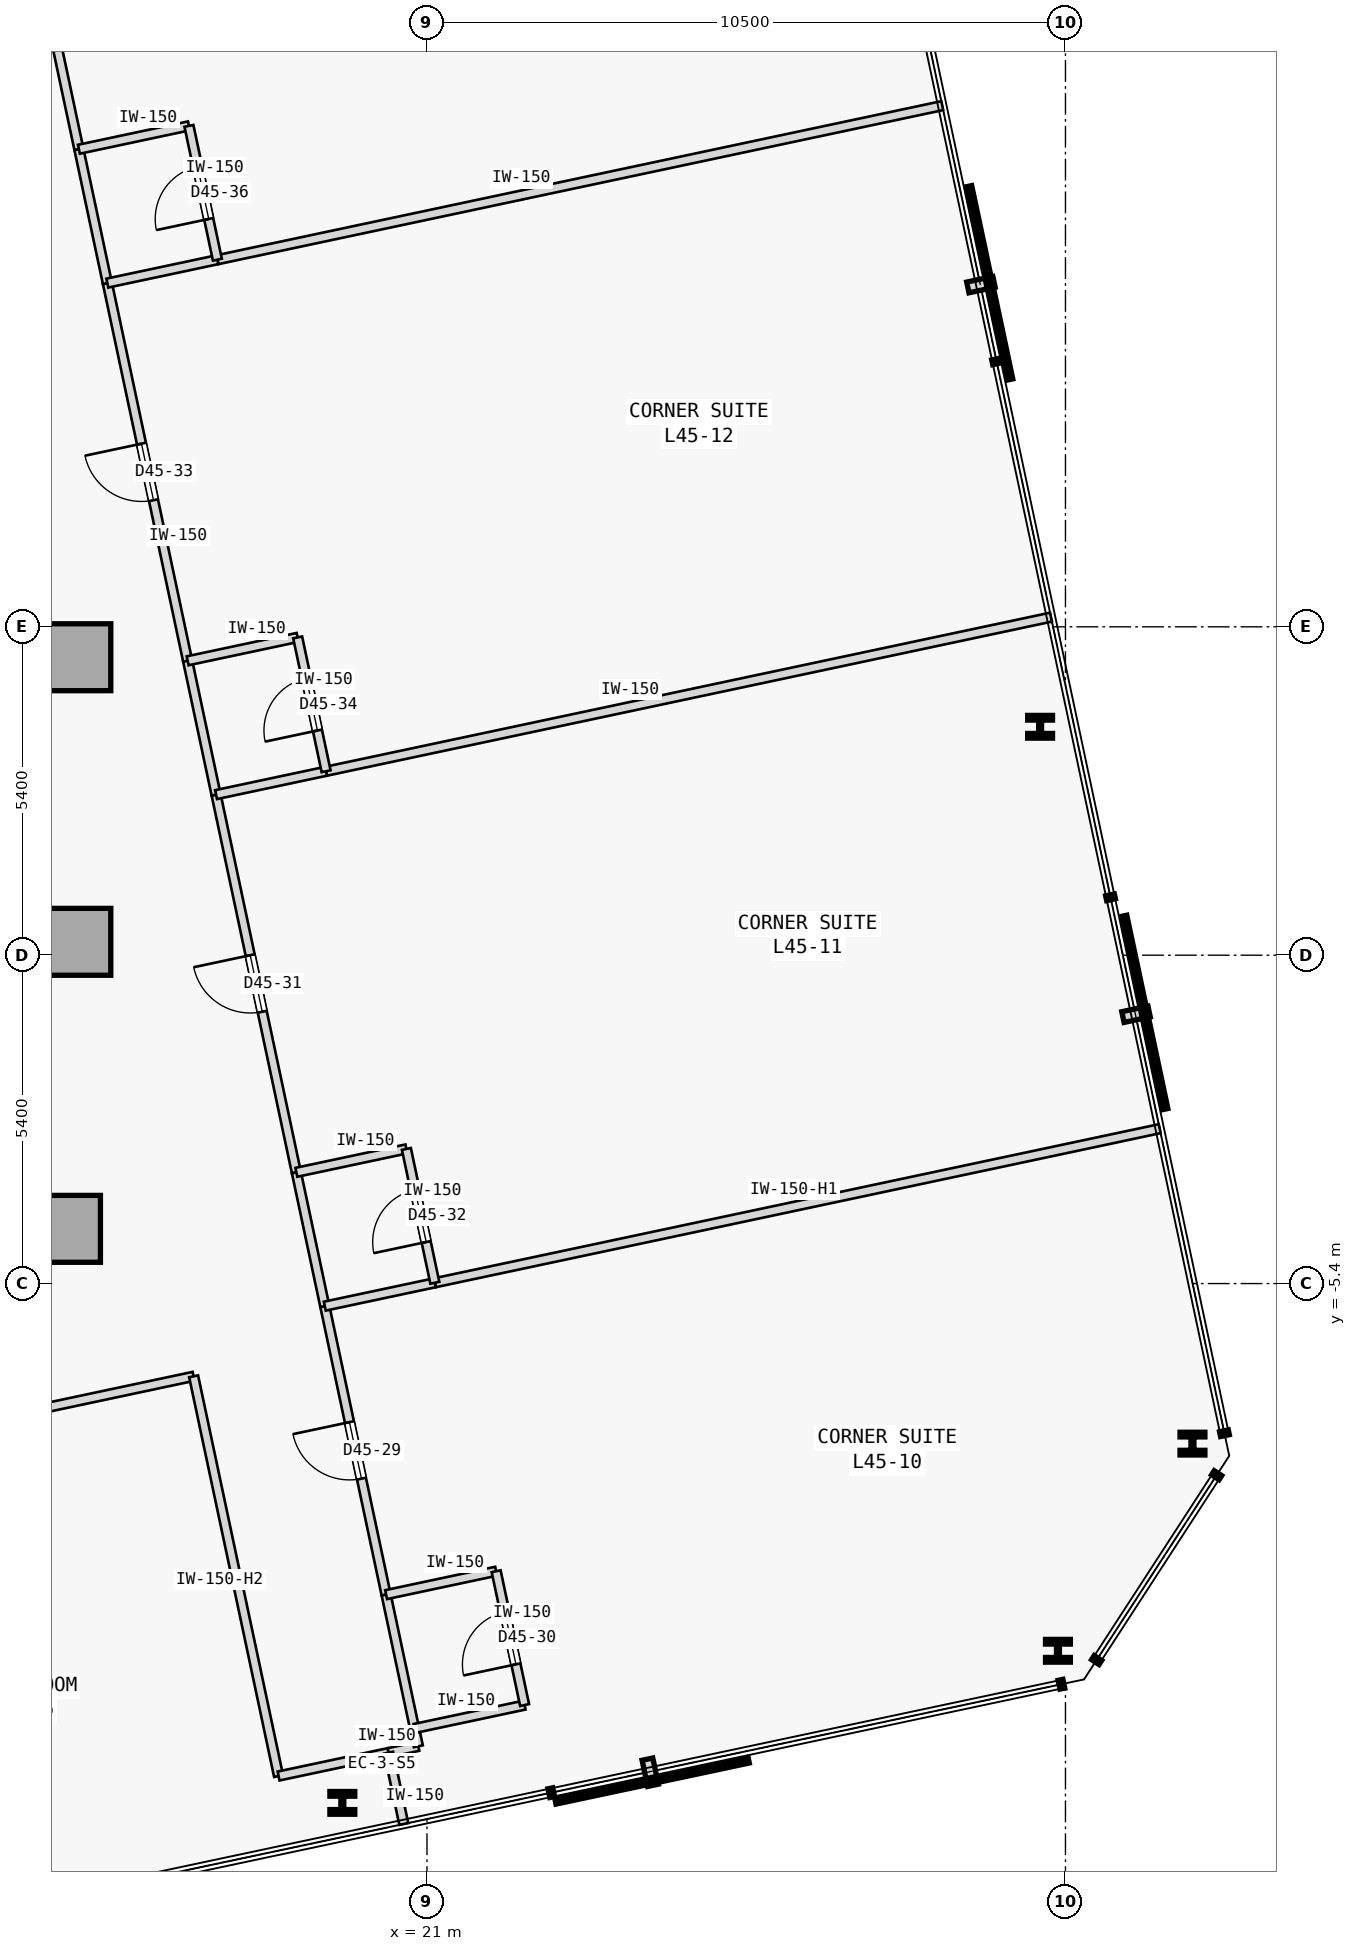
"""IFC4 building model, lengths in metres.
Left out: names, types, materials, properties, quantities, classifications, styles, units other than length and angle.
Written with IfcOpenShell. Run it as: python <this file> out.ifc"""

import sys

from ifc_helpers import new_model, si_unit, direction, frame, frame_2d, origin, origin_2d, place, context, subcontext, project, spatial, rectangle, i_section, extrude, element, fill, save


model = new_model("IFC4")
c1 = context("Model", 3, precision=1e-05, world=origin(), true_north=direction((0.0, 1.0)))
c2 = subcontext(c1, "Body", "Model", "MODEL_VIEW")
j1 = project(units=[si_unit("LENGTHUNIT", "METRE"), si_unit("PLANEANGLEUNIT", "RADIAN")], contexts=[c1])
p1 = place(None, origin())
s1 = spatial("IfcSite", under=j1, at=p1, CompositionType="ELEMENT")
p2 = place(p1, origin())
s2 = spatial("IfcBuilding", under=s1, at=p2, CompositionType="ELEMENT")
p3 = place(p2, frame((0.0, 0.0, 175.2)))
s3 = spatial("IfcBuildingStorey", under=s2, at=p3, CompositionType="ELEMENT", Elevation=175.2)
for number, where, z_axis, x_axis in (
    (1, (15.25, 4.9, 0.0), (0.0, 0.0, 1.0), (1.0, 0.0, 0.0)),
    (2, (15.25, 0.22, 0.0), (0.0, 0.0, 1.0), (1.0, 0.0, 0.0)),
    (3, (15.08, -4.5, 0.0), (0.0, 0.0, 1.0), (1.0, 0.0, 0.0)),
):
    element("IfcColumn", number, at=place(p3, frame(where, z_axis=z_axis, x_axis=x_axis)), inside=s3, PredefinedType="COLUMN", context=c2, shape_type="SweptSolid", body=[
        extrude(rectangle(XDim=1.1, YDim=1.1, at=origin_2d()), origin(), (0.0, 0.0, 1.0), 3.4),
    ])
for number, where, z_axis, x_axis in (
    (4, (19.608, -13.94, 0.0), (0.0, 0.0, 1.0), (1.0, 0.0, 0.0)),
    (5, (31.376, -11.439, 0.0), (0.0, 0.0, 1.0), (1.0, 0.0, 0.0)),
    (6, (33.589, -8.032, 0.0), (0.0, 0.0, 1.0), (1.0, 0.0, 0.0)),
    (7, (31.083, 3.756, 0.0), (0.0, 0.0, 1.0), (1.0, 0.0, 0.0)),
):
    element("IfcColumn", number, at=place(p3, frame(where, z_axis=z_axis, x_axis=x_axis)), inside=s3, PredefinedType="COLUMN", context=c2, shape_type="SweptSolid", body=[
        extrude(i_section(OverallWidth=0.409, OverallDepth=0.374, WebThickness=0.048, FlangeThickness=0.077, FilletRadius=0.015, at=origin_2d()), origin(), (0.0, 0.0, 1.0), 3.4),
    ])
p4 = place(p3, frame((10.309, -8.382, 0.0), z_axis=(0.0, 0.0, 1.0), x_axis=(0.978149817889, 0.207901259648, 0.0)))
e8 = element("IfcWall", 8, at=p4, inside=s3, PredefinedType="PARTITIONING", context=c2, shape_type="SweptSolid", body=[
    extrude(rectangle(XDim=7.007, YDim=0.15, at=frame_2d((3.503, 0.0))), origin(), (0.0, 0.0, 1.0), 3.175),
])
p5 = place(p4, frame((3.043, 0.0, 0.0)))
e9 = element("IfcOpeningElement", 9, at=p5, cuts=e8, PredefinedType="OPENING", context=c2, shape_type="SweptSolid", body=[
    extrude(rectangle(XDim=0.92, YDim=2.15, at=frame_2d((0.46, 1.075))), frame((0.0, 0.085, 0.0), z_axis=(0.0, -1.0, 0.0), x_axis=(1.0, 0.0, 0.0)), (0.0, 0.0, 1.0), 0.17),
])
p6 = place(p3, frame((18.56, -13.498, 0.0), z_axis=(0.0, 0.0, 1.0), x_axis=(-0.207888737749, 0.978152479278, 0.0)))
e10 = element("IfcWall", 10, at=p6, inside=s3, PredefinedType="PARTITIONING", context=c2, shape_type="SweptSolid", body=[
    extrude(rectangle(XDim=6.72, YDim=0.15, at=frame_2d((3.36, 0.0))), origin(), (0.0, 0.0, 1.0), 2.575),
])
p7 = place(p3, frame((18.56, -13.498, 0.0), z_axis=(0.0, 0.0, 1.0), x_axis=(0.978160192495, 0.207852442415, 0.0)))
e11 = element("IfcWall", 11, at=p7, inside=s3, PredefinedType="PARTITIONING", context=c2, shape_type="SweptSolid", body=[
    extrude(rectangle(XDim=1.85, YDim=0.15, at=frame_2d((0.925, 0.0))), origin(), (0.0, 0.0, 1.0), 3.175),
])
p8 = place(p3, frame((20.369, -13.114, 0.0), z_axis=(0.0, 0.0, 1.0), x_axis=(0.978143962546, 0.207928806409, 0.0)))
e12 = element("IfcWall", 12, at=p8, inside=s3, PredefinedType="PARTITIONING", context=c2, shape_type="SweptSolid", body=[
    extrude(rectangle(XDim=0.5, YDim=0.15, at=frame_2d((0.25, 0.0))), origin(), (0.0, 0.0, 1.0), 3.175),
])
p9 = place(p3, frame((20.858, -13.01, 0.0), z_axis=(0.0, 0.0, 1.0), x_axis=(-0.208306395052, 0.978063620518, 0.0)))
e13 = element("IfcWall", 13, at=p9, inside=s3, PredefinedType="PARTITIONING", context=c2, shape_type="SweptSolid", body=[
    extrude(rectangle(XDim=0.3, YDim=0.15, at=frame_2d((0.15, 0.0))), origin(), (0.0, 0.0, 1.0), 3.175),
])
p10 = place(p3, frame((20.328, -10.515, 0.0), z_axis=(0.0, 0.0, 1.0), x_axis=(-0.207950868925, 0.97813927235, 0.0)))
e14 = element("IfcWall", 14, at=p10, inside=s3, PredefinedType="PARTITIONING", context=c2, shape_type="SweptSolid", body=[
    extrude(rectangle(XDim=4.85, YDim=0.15, at=frame_2d((2.425, 0.0))), origin(), (0.0, 0.0, 1.0), 3.175),
])
p11 = place(p10, frame((1.95, 0.0, 0.0)))
e15 = element("IfcOpeningElement", 15, at=p11, cuts=e14, PredefinedType="OPENING", context=c2, shape_type="SweptSolid", body=[
    extrude(rectangle(XDim=0.95, YDim=2.15, at=frame_2d((0.475, 1.075))), frame((0.0, 0.085, 0.0), z_axis=(0.0, -1.0, 0.0), x_axis=(1.0, 0.0, 0.0)), (0.0, 0.0, 1.0), 0.17),
])
p12 = place(p3, frame((20.796, -12.716, 0.0), z_axis=(0.0, 0.0, 1.0), x_axis=(-0.207891197838, 0.978151956427, 0.0)))
e16 = element("IfcWall", 16, at=p12, inside=s3, PredefinedType="PARTITIONING", context=c2, shape_type="SweptSolid", body=[
    extrude(rectangle(XDim=2.25, YDim=0.15, at=frame_2d((1.125, 0.0))), origin(), (0.0, 0.0, 1.0), 3.175),
])
p13 = place(p3, frame((18.852, -3.571, 0.0), z_axis=(0.0, 0.0, 1.0), x_axis=(-0.207879907349, 0.978154355979, 0.0)))
e17 = element("IfcWall", 17, at=p13, inside=s3, PredefinedType="PARTITIONING", context=c2, shape_type="SweptSolid", body=[
    extrude(rectangle(XDim=6.35, YDim=0.15, at=frame_2d((3.175, 0.0))), origin(), (0.0, 0.0, 1.0), 3.175),
])
p14 = place(p13, frame((2.7, 0.0, 0.0)))
e18 = element("IfcOpeningElement", 18, at=p14, cuts=e17, PredefinedType="OPENING", context=c2, shape_type="SweptSolid", body=[
    extrude(rectangle(XDim=0.95, YDim=2.15, at=frame_2d((0.475, 1.075))), frame((0.0, 0.085, 0.0), z_axis=(0.0, -1.0, 0.0), x_axis=(1.0, 0.0, 0.0)), (0.0, 0.0, 1.0), 0.17),
])
p15 = place(p3, frame((19.32, -5.771, 0.0), z_axis=(0.0, 0.0, 1.0), x_axis=(-0.207913264065, 0.978147266328, 0.0)))
e19 = element("IfcWall", 19, at=p15, inside=s3, PredefinedType="PARTITIONING", context=c2, shape_type="SweptSolid", body=[
    extrude(rectangle(XDim=2.25, YDim=0.15, at=frame_2d((1.125, 0.0))), origin(), (0.0, 0.0, 1.0), 3.175),
])
p16 = place(p3, frame((17.064, 4.841, 0.0), z_axis=(0.0, 0.0, 1.0), x_axis=(-0.207924511115, 0.978144875608, 0.0)))
e20 = element("IfcWall", 20, at=p16, inside=s3, PredefinedType="PARTITIONING", context=c2, shape_type="SweptSolid", body=[
    extrude(rectangle(XDim=6.35, YDim=0.15, at=frame_2d((3.175, 0.0))), origin(), (0.0, 0.0, 1.0), 3.175),
])
p17 = place(p16, frame((2.7, 0.0, 0.0)))
e21 = element("IfcOpeningElement", 21, at=p17, cuts=e20, PredefinedType="OPENING", context=c2, shape_type="SweptSolid", body=[
    extrude(rectangle(XDim=0.95, YDim=2.15, at=frame_2d((0.475, 1.075))), frame((0.0, 0.085, 0.0), z_axis=(0.0, -1.0, 0.0), x_axis=(1.0, 0.0, 0.0)), (0.0, 0.0, 1.0), 0.17),
])
p18 = place(p3, frame((17.532, 2.641, 0.0), z_axis=(0.0, 0.0, 1.0), x_axis=(-0.207913264065, 0.978147266328, 0.0)))
e22 = element("IfcWall", 22, at=p18, inside=s3, PredefinedType="PARTITIONING", context=c2, shape_type="SweptSolid", body=[
    extrude(rectangle(XDim=2.25, YDim=0.15, at=frame_2d((1.125, 0.0))), origin(), (0.0, 0.0, 1.0), 3.175),
])
p19 = place(p3, frame((15.276, 13.253, 0.0), z_axis=(0.0, 0.0, 1.0), x_axis=(-0.207924511115, 0.978144875608, 0.0)))
e23 = element("IfcWall", 23, at=p19, inside=s3, PredefinedType="PARTITIONING", context=c2, shape_type="SweptSolid", body=[
    extrude(rectangle(XDim=6.35, YDim=0.15, at=frame_2d((3.175, 0.0))), origin(), (0.0, 0.0, 1.0), 3.175),
])
p20 = place(p19, frame((2.7, 0.0, 0.0)))
e24 = element("IfcOpeningElement", 24, at=p20, cuts=e23, PredefinedType="OPENING", context=c2, shape_type="SweptSolid", body=[
    extrude(rectangle(XDim=0.95, YDim=2.15, at=frame_2d((0.475, 1.075))), frame((0.0, 0.085, 0.0), z_axis=(0.0, -1.0, 0.0), x_axis=(1.0, 0.0, 0.0)), (0.0, 0.0, 1.0), 0.17),
])
p21 = place(p3, frame((15.744, 11.052, 0.0), z_axis=(0.0, 0.0, 1.0), x_axis=(-0.207891197838, 0.978151956427, 0.0)))
e25 = element("IfcWall", 25, at=p21, inside=s3, PredefinedType="PARTITIONING", context=c2, shape_type="SweptSolid", body=[
    extrude(rectangle(XDim=2.25, YDim=0.15, at=frame_2d((1.125, 0.0))), origin(), (0.0, 0.0, 1.0), 3.175),
])
p22 = place(p3, frame((20.619, -14.288, 0.0), z_axis=(0.0, 0.0, 1.0), x_axis=(-0.207917150959, 0.978146440129, 0.0)))
e26 = element("IfcWall", 26, at=p22, inside=s3, PredefinedType="PARTITIONING", context=c2, shape_type="SweptSolid", body=[
    extrude(rectangle(XDim=1.2, YDim=0.15, at=frame_2d((0.6, 0.0))), origin(), (0.0, 0.0, 1.0), 3.175),
])
for number, where, z_axis, x_axis in (
    (27, (20.796, -12.716, 0.0), (0.0, 0.0, 1.0), (0.978, 0.208, 0.0)),
    (28, (20.328, -10.515, 0.0), (0.0, 0.0, 1.0), (0.978, 0.208, 0.0)),
):
    element("IfcWall", number, at=place(p3, frame(where, z_axis=z_axis, x_axis=x_axis)), inside=s3, PredefinedType="PARTITIONING", context=c2, shape_type="SweptSolid", body=[
        extrude(rectangle(XDim=1.85, YDim=0.15, at=frame_2d((0.925, 0.0))), origin(), (0.0, 0.0, 1.0), 3.175),
    ])
p23 = place(p3, frame((22.605, -12.332, 0.0), z_axis=(0.0, 0.0, 1.0), x_axis=(-0.207891197838, 0.978151956427, 0.0)))
e29 = element("IfcWall", 29, at=p23, inside=s3, PredefinedType="PARTITIONING", context=c2, shape_type="SweptSolid", body=[
    extrude(rectangle(XDim=2.25, YDim=0.15, at=frame_2d((1.125, 0.0))), origin(), (0.0, 0.0, 1.0), 3.175),
])
p24 = place(p23, frame((0.685, 0.0, 0.0)))
e30 = element("IfcOpeningElement", 30, at=p24, cuts=e29, PredefinedType="OPENING", context=c2, shape_type="SweptSolid", body=[
    extrude(rectangle(XDim=0.88, YDim=2.15, at=frame_2d((0.44, 1.075))), frame((0.0, 0.085, 0.0), z_axis=(0.0, -1.0, 0.0), x_axis=(1.0, 0.0, 0.0)), (0.0, 0.0, 1.0), 0.17),
])
p25 = place(p3, frame((21.129, -5.387, 0.0), z_axis=(0.0, 0.0, 1.0), x_axis=(0.97814556055, 0.207921288896, 0.0)))
e31 = element("IfcWall", 31, at=p25, inside=s3, PredefinedType="PARTITIONING", context=c2, shape_type="SweptSolid", body=[
    extrude(rectangle(XDim=12.187, YDim=0.15, at=frame_2d((6.094, 0.0))), origin(), (0.0, 0.0, 1.0), 2.725),
])
p26 = place(p3, frame((19.32, -5.771, 0.0), z_axis=(0.0, 0.0, 1.0), x_axis=(0.978165892835, 0.207825614625, 0.0)))
e32 = element("IfcWall", 32, at=p26, inside=s3, PredefinedType="PARTITIONING", context=c2, shape_type="SweptSolid", body=[
    extrude(rectangle(XDim=1.85, YDim=0.15, at=frame_2d((0.925, 0.0))), origin(), (0.0, 0.0, 1.0), 3.175),
])
p27 = place(p3, frame((18.852, -3.571, 0.0), z_axis=(0.0, 0.0, 1.0), x_axis=(0.978139061018, 0.207951862966, 0.0)))
e33 = element("IfcWall", 33, at=p27, inside=s3, PredefinedType="PARTITIONING", context=c2, shape_type="SweptSolid", body=[
    extrude(rectangle(XDim=1.85, YDim=0.15, at=frame_2d((0.925, 0.0))), origin(), (0.0, 0.0, 1.0), 3.175),
])
p28 = place(p3, frame((21.129, -5.387, 0.0), z_axis=(0.0, 0.0, 1.0), x_axis=(-0.207891197838, 0.978151956427, 0.0)))
e34 = element("IfcWall", 34, at=p28, inside=s3, PredefinedType="PARTITIONING", context=c2, shape_type="SweptSolid", body=[
    extrude(rectangle(XDim=2.25, YDim=0.15, at=frame_2d((1.125, 0.0))), origin(), (0.0, 0.0, 1.0), 3.175),
])
p29 = place(p28, frame((0.685, 0.0, 0.0)))
e35 = element("IfcOpeningElement", 35, at=p29, cuts=e34, PredefinedType="OPENING", context=c2, shape_type="SweptSolid", body=[
    extrude(rectangle(XDim=0.88, YDim=2.15, at=frame_2d((0.44, 1.075))), frame((0.0, 0.085, 0.0), z_axis=(0.0, -1.0, 0.0), x_axis=(1.0, 0.0, 0.0)), (0.0, 0.0, 1.0), 0.17),
])
p30 = place(p3, frame((19.341, 3.025, 0.0), z_axis=(0.0, 0.0, 1.0), x_axis=(0.97814556055, 0.207921288896, 0.0)))
e36 = element("IfcWall", 36, at=p30, inside=s3, PredefinedType="PARTITIONING", context=c2, shape_type="SweptSolid", body=[
    extrude(rectangle(XDim=12.187, YDim=0.15, at=frame_2d((6.094, 0.0))), origin(), (0.0, 0.0, 1.0), 3.175),
])
p31 = place(p3, frame((17.532, 2.641, 0.0), z_axis=(0.0, 0.0, 1.0), x_axis=(0.978160192495, 0.207852442415, 0.0)))
e37 = element("IfcWall", 37, at=p31, inside=s3, PredefinedType="PARTITIONING", context=c2, shape_type="SweptSolid", body=[
    extrude(rectangle(XDim=1.85, YDim=0.15, at=frame_2d((0.925, 0.0))), origin(), (0.0, 0.0, 1.0), 3.175),
])
p32 = place(p3, frame((17.064, 4.841, 0.0), z_axis=(0.0, 0.0, 1.0), x_axis=(0.978133353907, 0.20797870558, 0.0)))
e38 = element("IfcWall", 38, at=p32, inside=s3, PredefinedType="PARTITIONING", context=c2, shape_type="SweptSolid", body=[
    extrude(rectangle(XDim=1.85, YDim=0.15, at=frame_2d((0.925, 0.0))), origin(), (0.0, 0.0, 1.0), 3.175),
])
p33 = place(p3, frame((19.341, 3.025, 0.0), z_axis=(0.0, 0.0, 1.0), x_axis=(-0.207891197838, 0.978151956427, 0.0)))
e39 = element("IfcWall", 39, at=p33, inside=s3, PredefinedType="PARTITIONING", context=c2, shape_type="SweptSolid", body=[
    extrude(rectangle(XDim=2.25, YDim=0.15, at=frame_2d((1.125, 0.0))), origin(), (0.0, 0.0, 1.0), 3.175),
])
p34 = place(p33, frame((0.685, 0.0, 0.0)))
e40 = element("IfcOpeningElement", 40, at=p34, cuts=e39, PredefinedType="OPENING", context=c2, shape_type="SweptSolid", body=[
    extrude(rectangle(XDim=0.88, YDim=2.15, at=frame_2d((0.44, 1.075))), frame((0.0, 0.085, 0.0), z_axis=(0.0, -1.0, 0.0), x_axis=(1.0, 0.0, 0.0)), (0.0, 0.0, 1.0), 0.17),
])
p35 = place(p3, frame((17.553, 11.437, 0.0), z_axis=(0.0, 0.0, 1.0), x_axis=(0.97814556055, 0.207921288896, 0.0)))
e41 = element("IfcWall", 41, at=p35, inside=s3, PredefinedType="PARTITIONING", context=c2, shape_type="SweptSolid", body=[
    extrude(rectangle(XDim=12.187, YDim=0.15, at=frame_2d((6.094, 0.0))), origin(), (0.0, 0.0, 1.0), 3.175),
])
for number, where, z_axis, x_axis in (
    (42, (15.744, 11.052, 0.0), (0.0, 0.0, 1.0), (0.978, 0.208, 0.0)),
    (43, (15.276, 13.253, 0.0), (0.0, 0.0, 1.0), (0.978, 0.208, 0.0)),
):
    element("IfcWall", number, at=place(p3, frame(where, z_axis=z_axis, x_axis=x_axis)), inside=s3, PredefinedType="PARTITIONING", context=c2, shape_type="SweptSolid", body=[
        extrude(rectangle(XDim=1.85, YDim=0.15, at=frame_2d((0.925, 0.0))), origin(), (0.0, 0.0, 1.0), 3.175),
    ])
p36 = place(p3, frame((17.553, 11.437, 0.0), z_axis=(0.0, 0.0, 1.0), x_axis=(-0.207891197838, 0.978151956427, 0.0)))
e44 = element("IfcWall", 44, at=p36, inside=s3, PredefinedType="PARTITIONING", context=c2, shape_type="SweptSolid", body=[
    extrude(rectangle(XDim=2.25, YDim=0.15, at=frame_2d((1.125, 0.0))), origin(), (0.0, 0.0, 1.0), 3.175),
])
p37 = place(p36, frame((0.685, 0.0, 0.0)))
e45 = element("IfcOpeningElement", 45, at=p37, cuts=e44, PredefinedType="OPENING", context=c2, shape_type="SweptSolid", body=[
    extrude(rectangle(XDim=0.88, YDim=2.15, at=frame_2d((0.44, 1.075))), frame((0.0, 0.085, 0.0), z_axis=(0.0, -1.0, 0.0), x_axis=(1.0, 0.0, 0.0)), (0.0, 0.0, 1.0), 0.17),
])
p38 = place(p11, origin())
e46 = element("IfcDoor", 46, at=p38, inside=s3, OperationType="SINGLE_SWING_RIGHT", PredefinedType="DOOR", context=c2, shape_type="SweptSolid", body=[
    extrude(rectangle(XDim=0.95, YDim=2.15, at=frame_2d((0.475, 1.075))), frame((0.0, 0.025, 0.0), z_axis=(0.0, -1.0, 0.0), x_axis=(1.0, 0.0, 0.0)), (0.0, 0.0, 1.0), 0.05),
])
fill(e15, e46)
p39 = place(p24, origin())
e47 = element("IfcDoor", 47, at=p39, inside=s3, OperationType="SINGLE_SWING_LEFT", PredefinedType="DOOR", context=c2, shape_type="SweptSolid", body=[
    extrude(rectangle(XDim=0.88, YDim=2.15, at=frame_2d((0.44, 1.075))), frame((0.0, 0.025, 0.0), z_axis=(0.0, -1.0, 0.0), x_axis=(1.0, 0.0, 0.0)), (0.0, 0.0, 1.0), 0.05),
])
fill(e30, e47)
p40 = place(p14, origin())
e48 = element("IfcDoor", 48, at=p40, inside=s3, OperationType="SINGLE_SWING_RIGHT", PredefinedType="DOOR", context=c2, shape_type="SweptSolid", body=[
    extrude(rectangle(XDim=0.95, YDim=2.15, at=frame_2d((0.475, 1.075))), frame((0.0, 0.025, 0.0), z_axis=(0.0, -1.0, 0.0), x_axis=(1.0, 0.0, 0.0)), (0.0, 0.0, 1.0), 0.05),
])
fill(e18, e48)
p41 = place(p29, origin())
e49 = element("IfcDoor", 49, at=p41, inside=s3, OperationType="SINGLE_SWING_LEFT", PredefinedType="DOOR", context=c2, shape_type="SweptSolid", body=[
    extrude(rectangle(XDim=0.88, YDim=2.15, at=frame_2d((0.44, 1.075))), frame((0.0, 0.025, 0.0), z_axis=(0.0, -1.0, 0.0), x_axis=(1.0, 0.0, 0.0)), (0.0, 0.0, 1.0), 0.05),
])
fill(e35, e49)
p42 = place(p17, origin())
e50 = element("IfcDoor", 50, at=p42, inside=s3, OperationType="SINGLE_SWING_RIGHT", PredefinedType="DOOR", context=c2, shape_type="SweptSolid", body=[
    extrude(rectangle(XDim=0.95, YDim=2.15, at=frame_2d((0.475, 1.075))), frame((0.0, 0.025, 0.0), z_axis=(0.0, -1.0, 0.0), x_axis=(1.0, 0.0, 0.0)), (0.0, 0.0, 1.0), 0.05),
])
fill(e21, e50)
p43 = place(p34, origin())
e51 = element("IfcDoor", 51, at=p43, inside=s3, OperationType="SINGLE_SWING_LEFT", PredefinedType="DOOR", context=c2, shape_type="SweptSolid", body=[
    extrude(rectangle(XDim=0.88, YDim=2.15, at=frame_2d((0.44, 1.075))), frame((0.0, 0.025, 0.0), z_axis=(0.0, -1.0, 0.0), x_axis=(1.0, 0.0, 0.0)), (0.0, 0.0, 1.0), 0.05),
])
fill(e40, e51)
p44 = place(p37, origin())
e52 = element("IfcDoor", 52, at=p44, inside=s3, OperationType="SINGLE_SWING_LEFT", PredefinedType="DOOR", context=c2, shape_type="SweptSolid", body=[
    extrude(rectangle(XDim=0.88, YDim=2.15, at=frame_2d((0.44, 1.075))), frame((0.0, 0.025, 0.0), z_axis=(0.0, -1.0, 0.0), x_axis=(1.0, 0.0, 0.0)), (0.0, 0.0, 1.0), 0.05),
])
fill(e45, e52)
save(model, sys.argv[1])
